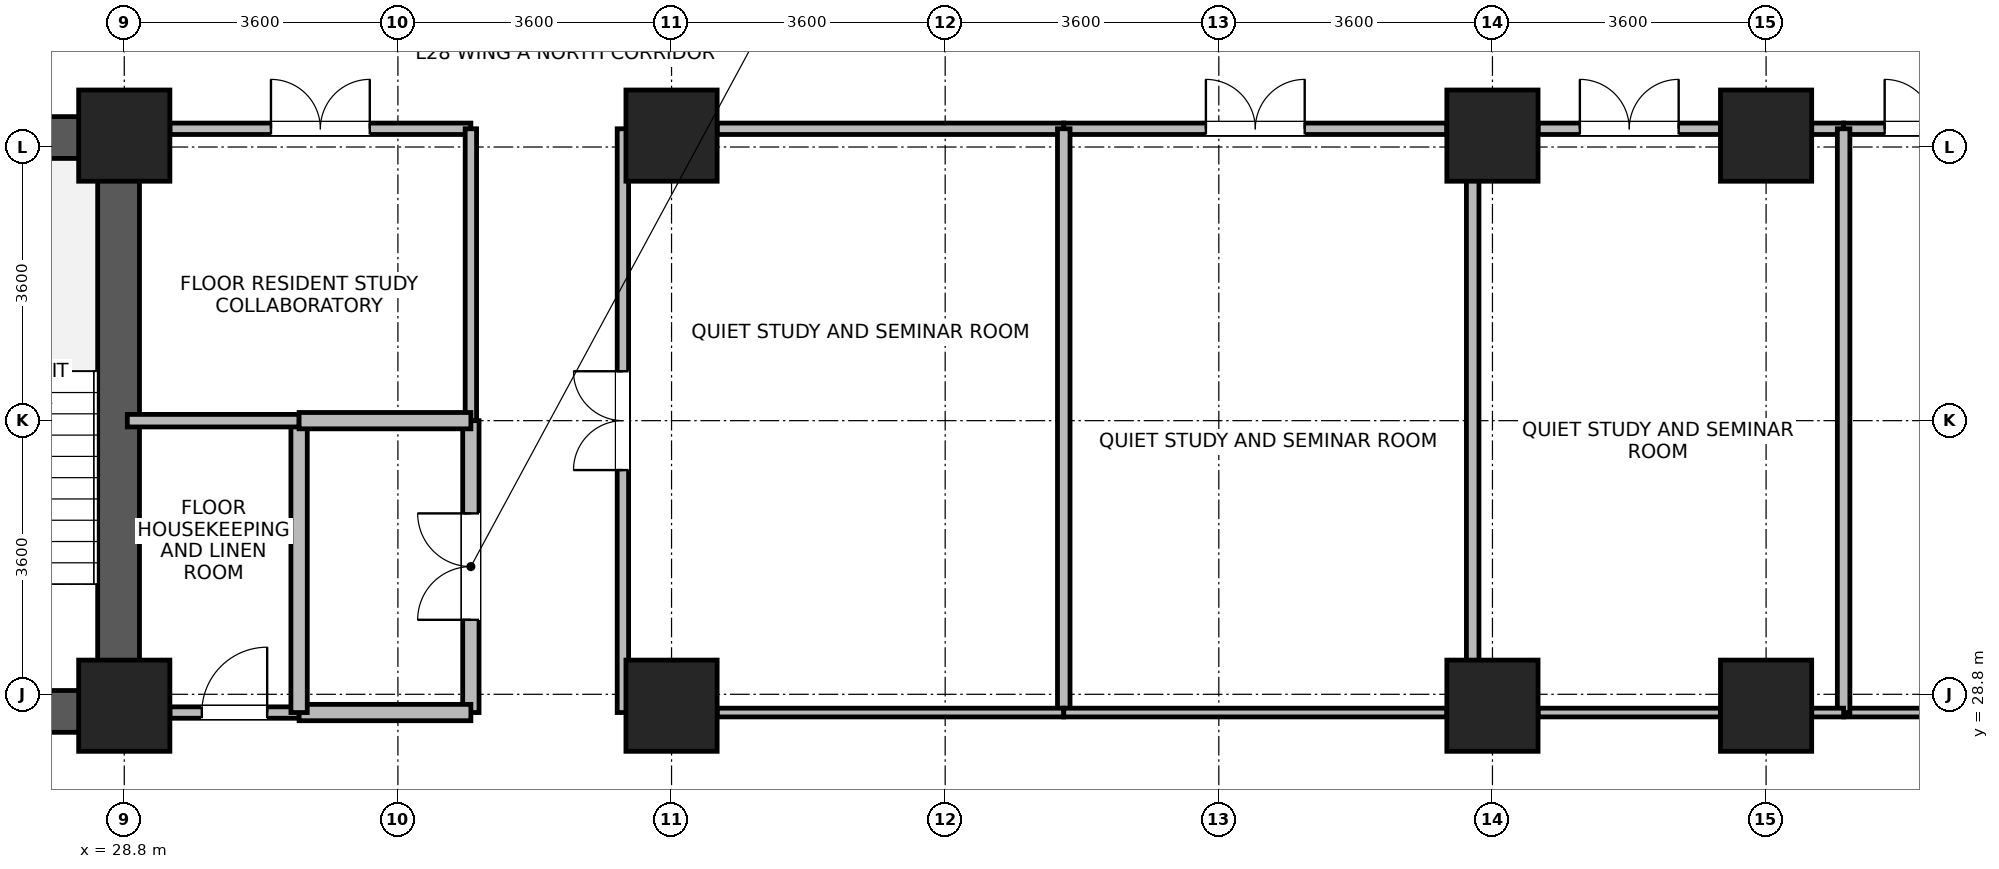
"""IFC4 building model, lengths in metres.
Left out: names, types, materials, properties, quantities, classifications, styles, units other than length and angle.
Written with IfcOpenShell. Run it as: python <this file> out.ifc"""

import sys

from ifc_helpers import new_model, si_unit, direction, frame, frame_2d, origin, origin_2d, place, context, subcontext, project, spatial, rectangle, extrude, source, transform, mapped, element, fill, save


model = new_model("IFC4")
c1 = context("Model", 3, precision=1e-05, world=origin(), true_north=direction((0.0, 1.0)))
c2 = subcontext(c1, "Body", "Model", "MODEL_VIEW")
j1 = project(units=[si_unit("LENGTHUNIT", "METRE"), si_unit("PLANEANGLEUNIT", "RADIAN")], contexts=[c1])
p1 = place(None, origin())
s1 = spatial("IfcSite", under=j1, at=p1, CompositionType="ELEMENT")
p2 = place(p1, origin())
s2 = spatial("IfcBuilding", under=s1, at=p2, CompositionType="ELEMENT")
p3 = place(p2, frame((0.0, 0.0, 111.9)))
s3 = spatial("IfcBuildingStorey", under=s2, at=p3, CompositionType="ELEMENT", Elevation=111.9)
p4 = place(p3, frame((28.725, 28.3, 0.0), z_axis=(0.0, 0.0, 1.0), x_axis=(0.0, 1.0, 0.0)))
e1 = element("IfcWall", 1, at=p4, inside=s3, PredefinedType="SHEAR", context=c2, shape_type="SweptSolid", body=[
    extrude(rectangle(XDim=8.1, YDim=0.55, at=frame_2d((4.05, 0.0))), origin(), (0.0, 0.0, 1.0), 3.45),
])
for number, where, z_axis, x_axis in (
    (2, (25.25, 28.575, 0.0), (0.0, 0.0, 1.0), (1.0, 0.0, 0.0)),
    (3, (25.25, 36.125, 0.0), (0.0, 0.0, 1.0), (1.0, 0.0, 0.0)),
):
    element("IfcWall", number, at=place(p3, frame(where, z_axis=z_axis, x_axis=x_axis)), inside=s3, PredefinedType="SHEAR", context=c2, shape_type="SweptSolid", body=[
        extrude(rectangle(XDim=3.2, YDim=0.55, at=frame_2d((1.6, 0.0))), origin(), (0.0, 0.0, 1.0), 3.45),
    ])
m1 = source(origin(), c2, "Body", "SweptSolid", [
    extrude(rectangle(XDim=1.2, YDim=1.2, at=origin_2d()), origin(), (0.0, 0.0, 1.0), 3.7),
])
for number, where, z_axis, x_axis in (
    (4, (28.8, 28.65, 0.0), (0.0, 0.0, 1.0), (1.0, 0.0, 0.0)),
    (5, (28.8, 36.15, 0.0), (0.0, 0.0, 1.0), (1.0, 0.0, 0.0)),
    (6, (36.0, 28.65, 0.0), (0.0, 0.0, 1.0), (1.0, 0.0, 0.0)),
    (7, (36.0, 36.15, 0.0), (0.0, 0.0, 1.0), (1.0, 0.0, 0.0)),
    (8, (46.8, 28.65, 0.0), (0.0, 0.0, 1.0), (1.0, 0.0, 0.0)),
    (9, (46.8, 36.15, 0.0), (0.0, 0.0, 1.0), (1.0, 0.0, 0.0)),
    (10, (50.4, 28.65, 0.0), (0.0, 0.0, 1.0), (1.0, 0.0, 0.0)),
    (11, (50.4, 36.15, 0.0), (0.0, 0.0, 1.0), (1.0, 0.0, 0.0)),
):
    element("IfcColumn", number, at=place(p3, frame(where, z_axis=z_axis, x_axis=x_axis)), inside=s3, PredefinedType="COLUMN", context=c2, shape_type="MappedRepresentation", body=[
        mapped(m1, transform((0.0, 0.0, 0.0), x_axis=(1.0, 0.0, 0.0), y_axis=(0.0, 1.0, 0.0), z_axis=(0.0, 0.0, 1.0), scale=1.0)),
    ])
p5 = place(p3, frame((51.42, 36.24, 0.0), z_axis=(0.0, 0.0, 1.0), x_axis=(1.0, 0.0, 0.0)))
e12 = element("IfcWall", 12, at=p5, inside=s3, PredefinedType="PARTITIONING", context=c2, shape_type="SweptSolid", body=[
    extrude(rectangle(XDim=2.38, YDim=0.15, at=frame_2d((1.19, 0.0))), origin(), (0.0, 0.0, 1.0), 2.78),
])
p6 = place(p5, frame((0.54, 0.0, 0.0)))
e13 = element("IfcOpeningElement", 13, at=p6, cuts=e12, PredefinedType="OPENING", context=c2, shape_type="SweptSolid", body=[
    extrude(rectangle(XDim=1.3, YDim=2.12, at=frame_2d((0.65, 1.06))), frame((0.0, 0.085, 0.0), z_axis=(0.0, -1.0, 0.0), x_axis=(1.0, 0.0, 0.0)), (0.0, 0.0, 1.0), 0.17),
])
p7 = place(p3, frame((35.36, 28.56, 0.0), z_axis=(0.0, 0.0, 1.0), x_axis=(0.0, 1.0, 0.0)))
e14 = element("IfcWall", 14, at=p7, inside=s3, PredefinedType="PARTITIONING", context=c2, shape_type="SweptSolid", body=[
    extrude(rectangle(XDim=7.68, YDim=0.15, at=frame_2d((3.84, 0.0))), origin(), (0.0, 0.0, 1.0), 3.43),
])
p8 = place(p7, frame((3.19, 0.0, 0.0)))
e15 = element("IfcOpeningElement", 15, at=p8, cuts=e14, PredefinedType="OPENING", context=c2, shape_type="SweptSolid", body=[
    extrude(rectangle(XDim=1.3, YDim=2.12, at=frame_2d((0.65, 1.06))), frame((0.0, 0.085, 0.0), z_axis=(0.0, -1.0, 0.0), x_axis=(1.0, 0.0, 0.0)), (0.0, 0.0, 1.0), 0.17),
])
p9 = place(p3, frame((36.6, 36.24, 0.0), z_axis=(0.0, 0.0, 1.0), x_axis=(1.0, 0.0, 0.0)))
e16 = element("IfcWall", 16, at=p9, inside=s3, PredefinedType="PARTITIONING", context=c2, shape_type="SweptSolid", body=[
    extrude(rectangle(XDim=4.56, YDim=0.15, at=frame_2d((2.28, 0.0))), origin(), (0.0, 0.0, 1.0), 2.78),
])
p10 = place(p3, frame((41.16, 36.24, 0.0), z_axis=(0.0, 0.0, 1.0), x_axis=(1.0, 0.0, 0.0)))
e17 = element("IfcWall", 17, at=p10, inside=s3, PredefinedType="PARTITIONING", context=c2, shape_type="SweptSolid", body=[
    extrude(rectangle(XDim=5.04, YDim=0.15, at=frame_2d((2.52, 0.0))), origin(), (0.0, 0.0, 1.0), 2.78),
])
p11 = place(p10, frame((1.87, 0.0, 0.0)))
e18 = element("IfcOpeningElement", 18, at=p11, cuts=e17, PredefinedType="OPENING", context=c2, shape_type="SweptSolid", body=[
    extrude(rectangle(XDim=1.3, YDim=2.12, at=frame_2d((0.65, 1.06))), frame((0.0, 0.085, 0.0), z_axis=(0.0, -1.0, 0.0), x_axis=(1.0, 0.0, 0.0)), (0.0, 0.0, 1.0), 0.17),
])
p12 = place(p3, frame((47.4, 36.24, 0.0), z_axis=(0.0, 0.0, 1.0), x_axis=(1.0, 0.0, 0.0)))
e19 = element("IfcWall", 19, at=p12, inside=s3, PredefinedType="PARTITIONING", context=c2, shape_type="SweptSolid", body=[
    extrude(rectangle(XDim=2.4, YDim=0.15, at=frame_2d((1.2, 0.0))), origin(), (0.0, 0.0, 1.0), 2.78),
])
p13 = place(p12, frame((0.55, 0.0, 0.0)))
e20 = element("IfcOpeningElement", 20, at=p13, cuts=e19, PredefinedType="OPENING", context=c2, shape_type="SweptSolid", body=[
    extrude(rectangle(XDim=1.3, YDim=2.12, at=frame_2d((0.65, 1.06))), frame((0.0, 0.085, 0.0), z_axis=(0.0, -1.0, 0.0), x_axis=(1.0, 0.0, 0.0)), (0.0, 0.0, 1.0), 0.17),
])
p14 = place(p3, frame((51.0, 36.24, 0.0), z_axis=(0.0, 0.0, 1.0), x_axis=(1.0, 0.0, 0.0)))
e21 = element("IfcWall", 21, at=p14, inside=s3, PredefinedType="PARTITIONING", context=c2, shape_type="SweptSolid", body=[
    extrude(rectangle(XDim=0.42, YDim=0.15, at=frame_2d((0.21, 0.0))), origin(), (0.0, 0.0, 1.0), 2.78),
])
p15 = place(p3, frame((29.4, 36.24, 0.0), z_axis=(0.0, 0.0, 1.0), x_axis=(1.0, 0.0, 0.0)))
e22 = element("IfcWall", 22, at=p15, inside=s3, PredefinedType="PARTITIONING", context=c2, shape_type="SweptSolid", body=[
    extrude(rectangle(XDim=3.96, YDim=0.15, at=frame_2d((1.98, 0.0))), origin(), (0.0, 0.0, 1.0), 2.78),
])
p16 = place(p15, frame((1.33, 0.0, 0.0)))
e23 = element("IfcOpeningElement", 23, at=p16, cuts=e22, PredefinedType="OPENING", context=c2, shape_type="SweptSolid", body=[
    extrude(rectangle(XDim=1.3, YDim=2.12, at=frame_2d((0.65, 1.06))), frame((0.0, 0.085, 0.0), z_axis=(0.0, -1.0, 0.0), x_axis=(1.0, 0.0, 0.0)), (0.0, 0.0, 1.0), 0.17),
])
p17 = place(p3, frame((33.36, 32.4, 0.0), z_axis=(0.0, 0.0, 1.0), x_axis=(0.0, 1.0, 0.0)))
e24 = element("IfcWall", 24, at=p17, inside=s3, PredefinedType="PARTITIONING", context=c2, shape_type="SweptSolid", body=[
    extrude(rectangle(XDim=3.84, YDim=0.15, at=frame_2d((1.92, 0.0))), origin(), (0.0, 0.0, 1.0), 3.43),
])
p18 = place(p3, frame((33.36, 28.56, 0.0), z_axis=(0.0, 0.0, 1.0), x_axis=(0.0, 1.0, 0.0)))
e25 = element("IfcWall", 25, at=p18, inside=s3, PredefinedType="PARTITIONING", context=c2, shape_type="SweptSolid", body=[
    extrude(rectangle(XDim=3.84, YDim=0.215, at=frame_2d((1.92, 0.0))), origin(), (0.0, 0.0, 1.0), 3.43),
])
p19 = place(p18, frame((1.22, 0.0, 0.0)))
e26 = element("IfcOpeningElement", 26, at=p19, cuts=e25, PredefinedType="OPENING", context=c2, shape_type="SweptSolid", body=[
    extrude(rectangle(XDim=1.4, YDim=2.15, at=frame_2d((0.7, 1.075))), frame((0.0, 0.118, 0.0), z_axis=(0.0, -1.0, 0.0), x_axis=(1.0, 0.0, 0.0)), (0.0, 0.0, 1.0), 0.235),
])
p20 = place(p3, frame((29.4, 28.56, 0.0), z_axis=(0.0, 0.0, 1.0), x_axis=(1.0, 0.0, 0.0)))
e27 = element("IfcWall", 27, at=p20, inside=s3, PredefinedType="PARTITIONING", context=c2, shape_type="SweptSolid", body=[
    extrude(rectangle(XDim=1.7, YDim=0.15, at=frame_2d((0.85, 0.0))), origin(), (0.0, 0.0, 1.0), 2.78),
])
p21 = place(p20, frame((0.42, 0.0, 0.0)))
e28 = element("IfcOpeningElement", 28, at=p21, cuts=e27, PredefinedType="OPENING", context=c2, shape_type="SweptSolid", body=[
    extrude(rectangle(XDim=0.86, YDim=2.02, at=frame_2d((0.43, 1.01))), frame((0.0, 0.085, 0.0), z_axis=(0.0, -1.0, 0.0), x_axis=(1.0, 0.0, 0.0)), (0.0, 0.0, 1.0), 0.17),
])
p22 = place(p3, frame((31.1, 28.56, 0.0), z_axis=(0.0, 0.0, 1.0), x_axis=(1.0, 0.0, 0.0)))
e29 = element("IfcWall", 29, at=p22, inside=s3, PredefinedType="PARTITIONING", context=c2, shape_type="SweptSolid", body=[
    extrude(rectangle(XDim=2.26, YDim=0.215, at=frame_2d((1.13, 0.0))), origin(), (0.0, 0.0, 1.0), 2.78),
])
p23 = place(p3, frame((51.42, 28.56, 0.0), z_axis=(0.0, 0.0, 1.0), x_axis=(1.0, 0.0, 0.0)))
e30 = element("IfcWall", 30, at=p23, inside=s3, PredefinedType="PARTITIONING", context=c2, shape_type="SweptSolid", body=[
    extrude(rectangle(XDim=2.38, YDim=0.115, at=frame_2d((1.19, 0.0))), origin(), (0.0, 0.0, 1.0), 2.78),
])
for number, where, z_axis, x_axis in (
    (31, (41.16, 28.56, 0.0), (0.0, 0.0, 1.0), (0.0, 1.0, 0.0)),
    (32, (46.54, 28.56, 0.0), (0.0, 0.0, 1.0), (0.0, 1.0, 0.0)),
    (33, (51.42, 28.56, 0.0), (0.0, 0.0, 1.0), (0.0, 1.0, 0.0)),
):
    element("IfcWall", number, at=place(p3, frame(where, z_axis=z_axis, x_axis=x_axis)), inside=s3, PredefinedType="PARTITIONING", context=c2, shape_type="SweptSolid", body=[
        extrude(rectangle(XDim=7.68, YDim=0.165, at=frame_2d((3.84, 0.0))), origin(), (0.0, 0.0, 1.0), 3.43),
    ])
p24 = place(p3, frame((36.6, 28.56, 0.0), z_axis=(0.0, 0.0, 1.0), x_axis=(1.0, 0.0, 0.0)))
e34 = element("IfcWall", 34, at=p24, inside=s3, PredefinedType="PARTITIONING", context=c2, shape_type="SweptSolid", body=[
    extrude(rectangle(XDim=4.56, YDim=0.115, at=frame_2d((2.28, 0.0))), origin(), (0.0, 0.0, 1.0), 2.78),
])
p25 = place(p3, frame((41.16, 28.56, 0.0), z_axis=(0.0, 0.0, 1.0), x_axis=(1.0, 0.0, 0.0)))
e35 = element("IfcWall", 35, at=p25, inside=s3, PredefinedType="PARTITIONING", context=c2, shape_type="SweptSolid", body=[
    extrude(rectangle(XDim=5.04, YDim=0.115, at=frame_2d((2.52, 0.0))), origin(), (0.0, 0.0, 1.0), 2.78),
])
p26 = place(p3, frame((47.4, 28.56, 0.0), z_axis=(0.0, 0.0, 1.0), x_axis=(1.0, 0.0, 0.0)))
e36 = element("IfcWall", 36, at=p26, inside=s3, PredefinedType="PARTITIONING", context=c2, shape_type="SweptSolid", body=[
    extrude(rectangle(XDim=2.4, YDim=0.115, at=frame_2d((1.2, 0.0))), origin(), (0.0, 0.0, 1.0), 2.78),
])
p27 = place(p3, frame((51.0, 28.56, 0.0), z_axis=(0.0, 0.0, 1.0), x_axis=(1.0, 0.0, 0.0)))
e37 = element("IfcWall", 37, at=p27, inside=s3, PredefinedType="PARTITIONING", context=c2, shape_type="SweptSolid", body=[
    extrude(rectangle(XDim=0.42, YDim=0.115, at=frame_2d((0.21, 0.0))), origin(), (0.0, 0.0, 1.0), 2.78),
])
p28 = place(p3, frame((31.1, 28.56, 0.0), z_axis=(0.0, 0.0, 1.0), x_axis=(0.0, 1.0, 0.0)))
e38 = element("IfcWall", 38, at=p28, inside=s3, PredefinedType="PARTITIONING", context=c2, shape_type="SweptSolid", body=[
    extrude(rectangle(XDim=3.84, YDim=0.215, at=frame_2d((1.92, 0.0))), origin(), (0.0, 0.0, 1.0), 3.43),
])
p29 = place(p3, frame((28.84, 32.4, 0.0), z_axis=(0.0, 0.0, 1.0), x_axis=(1.0, 0.0, 0.0)))
e39 = element("IfcWall", 39, at=p29, inside=s3, PredefinedType="PARTITIONING", context=c2, shape_type="SweptSolid", body=[
    extrude(rectangle(XDim=2.26, YDim=0.165, at=frame_2d((1.13, 0.0))), origin(), (0.0, 0.0, 1.0), 3.43),
])
p30 = place(p3, frame((31.1, 32.4, 0.0), z_axis=(0.0, 0.0, 1.0), x_axis=(1.0, 0.0, 0.0)))
e40 = element("IfcWall", 40, at=p30, inside=s3, PredefinedType="PARTITIONING", context=c2, shape_type="SweptSolid", body=[
    extrude(rectangle(XDim=2.26, YDim=0.215, at=frame_2d((1.13, 0.0))), origin(), (0.0, 0.0, 1.0), 3.43),
])
p31 = place(p6, origin())
e41 = element("IfcDoor", 41, at=p31, inside=s3, OperationType="DOUBLE_DOOR_SINGLE_SWING", PredefinedType="DOOR", context=c2, shape_type="SweptSolid", body=[
    extrude(rectangle(XDim=1.3, YDim=2.12, at=frame_2d((0.65, 1.06))), frame((0.0, 0.025, 0.0), z_axis=(0.0, -1.0, 0.0), x_axis=(1.0, 0.0, 0.0)), (0.0, 0.0, 1.0), 0.05),
])
fill(e13, e41)
p32 = place(p8, origin())
e42 = element("IfcDoor", 42, at=p32, inside=s3, OperationType="DOUBLE_DOOR_SINGLE_SWING", PredefinedType="DOOR", context=c2, shape_type="SweptSolid", body=[
    extrude(rectangle(XDim=1.3, YDim=2.12, at=frame_2d((0.65, 1.06))), frame((0.0, 0.025, 0.0), z_axis=(0.0, -1.0, 0.0), x_axis=(1.0, 0.0, 0.0)), (0.0, 0.0, 1.0), 0.05),
])
fill(e15, e42)
p33 = place(p11, origin())
e43 = element("IfcDoor", 43, at=p33, inside=s3, OperationType="DOUBLE_DOOR_SINGLE_SWING", PredefinedType="DOOR", context=c2, shape_type="SweptSolid", body=[
    extrude(rectangle(XDim=1.3, YDim=2.12, at=frame_2d((0.65, 1.06))), frame((0.0, 0.025, 0.0), z_axis=(0.0, -1.0, 0.0), x_axis=(1.0, 0.0, 0.0)), (0.0, 0.0, 1.0), 0.05),
])
fill(e18, e43)
p34 = place(p13, origin())
e44 = element("IfcDoor", 44, at=p34, inside=s3, OperationType="DOUBLE_DOOR_SINGLE_SWING", PredefinedType="DOOR", context=c2, shape_type="SweptSolid", body=[
    extrude(rectangle(XDim=1.3, YDim=2.12, at=frame_2d((0.65, 1.06))), frame((0.0, 0.025, 0.0), z_axis=(0.0, -1.0, 0.0), x_axis=(1.0, 0.0, 0.0)), (0.0, 0.0, 1.0), 0.05),
])
fill(e20, e44)
p35 = place(p16, origin())
e45 = element("IfcDoor", 45, at=p35, inside=s3, OperationType="DOUBLE_DOOR_SINGLE_SWING", PredefinedType="DOOR", context=c2, shape_type="SweptSolid", body=[
    extrude(rectangle(XDim=1.3, YDim=2.12, at=frame_2d((0.65, 1.06))), frame((0.0, 0.025, 0.0), z_axis=(0.0, -1.0, 0.0), x_axis=(1.0, 0.0, 0.0)), (0.0, 0.0, 1.0), 0.05),
])
fill(e23, e45)
p36 = place(p19, origin())
e46 = element("IfcDoor", 46, at=p36, inside=s3, OperationType="DOUBLE_DOOR_SINGLE_SWING", PredefinedType="DOOR", context=c2, shape_type="SweptSolid", body=[
    extrude(rectangle(XDim=1.4, YDim=2.15, at=frame_2d((0.7, 1.075))), frame((0.0, 0.025, 0.0), z_axis=(0.0, -1.0, 0.0), x_axis=(1.0, 0.0, 0.0)), (0.0, 0.0, 1.0), 0.05),
])
fill(e26, e46)
p37 = place(p21, origin())
e47 = element("IfcDoor", 47, at=p37, inside=s3, OperationType="SINGLE_SWING_RIGHT", PredefinedType="DOOR", context=c2, shape_type="SweptSolid", body=[
    extrude(rectangle(XDim=0.86, YDim=2.02, at=frame_2d((0.43, 1.01))), frame((0.0, 0.025, 0.0), z_axis=(0.0, -1.0, 0.0), x_axis=(1.0, 0.0, 0.0)), (0.0, 0.0, 1.0), 0.05),
])
fill(e28, e47)
save(model, sys.argv[1])
